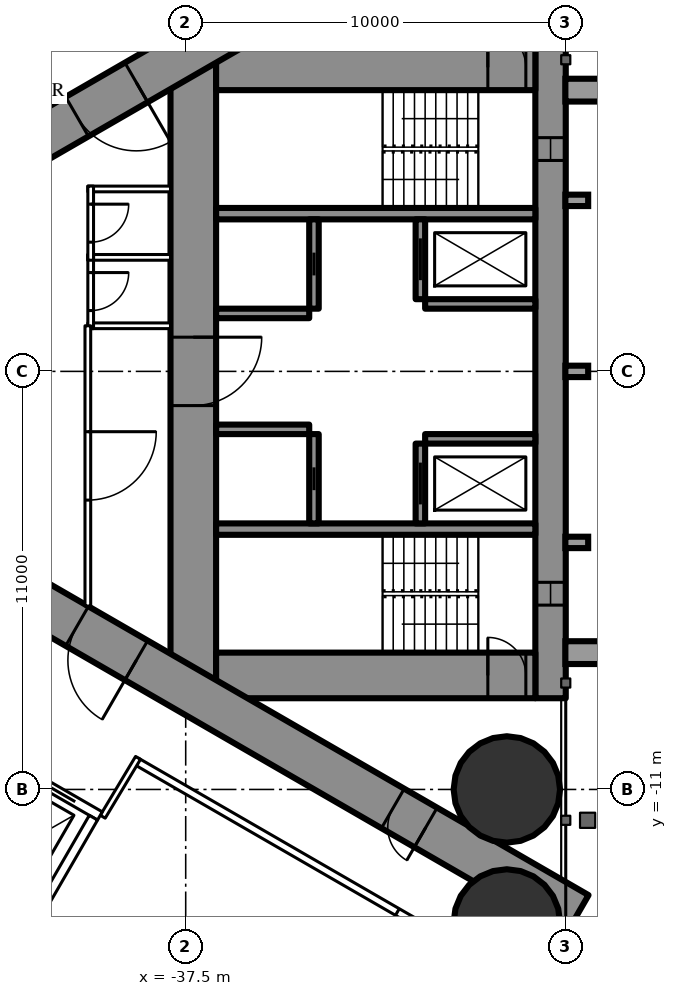
"""IFC4 building model, lengths in metres.
Left out: names, types, materials, properties, quantities, classifications, styles, units other than length and angle.
Written with IfcOpenShell. Run it as: python <this file> out.ifc"""

import sys

from ifc_helpers import new_model, si_unit, direction, frame, frame_2d, origin, origin_2d, place, context, subcontext, project, spatial, rectangle, circle, extrude, element, fill, save


model = new_model("IFC4")
c1 = context("Model", 3, precision=1e-05, world=origin(), true_north=direction((0.0, 1.0)))
c2 = subcontext(c1, "Body", "Model", "MODEL_VIEW")
j1 = project(units=[si_unit("LENGTHUNIT", "METRE"), si_unit("PLANEANGLEUNIT", "RADIAN")], contexts=[c1])
p1 = place(None, origin())
s1 = spatial("IfcSite", under=j1, at=p1, CompositionType="ELEMENT")
p2 = place(p1, origin())
s2 = spatial("IfcBuilding", under=s1, at=p2, CompositionType="ELEMENT")
p3 = place(p2, frame((0.0, 0.0, 163.3)))
s3 = spatial("IfcBuildingStorey", under=s2, at=p3, CompositionType="ELEMENT", Elevation=163.3)
for number, where, z_axis, x_axis in (
    (1, (-29.05, -11.0, 0.0), (0.0, 0.0, 1.0), (1.0, 0.0, 0.0)),
    (2, (-29.05, -14.5, 0.0), (0.0, 0.0, 1.0), (1.0, 0.0, 0.0)),
):
    element("IfcColumn", number, at=place(p3, frame(where, z_axis=z_axis, x_axis=x_axis)), inside=s3, PredefinedType="COLUMN", context=c2, shape_type="SweptSolid", body=[
        extrude(circle(Radius=1.4, at=origin_2d()), origin(), (0.0, 0.0, 1.0), 3.5),
    ])
p4 = place(p3, frame((-27.9, 8.6, 0.0), z_axis=(0.0, 0.0, 1.0), x_axis=(0.0, -1.0, 0.0)))
e3 = element("IfcWall", 3, at=p4, inside=s3, PredefinedType="SHEAR", context=c2, shape_type="SweptSolid", body=[
    extrude(rectangle(XDim=17.2, YDim=0.8, at=frame_2d((8.6, 0.0))), origin(), (0.0, 0.0, 1.0), 3.5),
])
p5 = place(p4, frame((2.45, 0.0, 0.6)))
e4 = element("IfcOpeningElement", 4, at=p5, cuts=e3, PredefinedType="OPENING", context=c2, shape_type="SweptSolid", body=[
    extrude(rectangle(XDim=0.6, YDim=2.1, at=frame_2d((0.3, 1.05))), frame((0.0, 0.41, 0.0), z_axis=(0.0, -1.0, 0.0), x_axis=(1.0, 0.0, 0.0)), (0.0, 0.0, 1.0), 0.82),
])
p6 = place(p4, frame((14.15, 0.0, 0.6)))
e5 = element("IfcOpeningElement", 5, at=p6, cuts=e3, PredefinedType="OPENING", context=c2, shape_type="SweptSolid", body=[
    extrude(rectangle(XDim=0.6, YDim=2.1, at=frame_2d((0.3, 1.05))), frame((0.0, 0.41, 0.0), z_axis=(0.0, -1.0, 0.0), x_axis=(1.0, 0.0, 0.0)), (0.0, 0.0, 1.0), 0.82),
])
p7 = place(p3, frame((-37.3, 8.6, 0.0), z_axis=(0.0, 0.0, 1.0), x_axis=(0.0, -1.0, 0.0)))
e6 = element("IfcWall", 6, at=p7, inside=s3, PredefinedType="SHEAR", context=c2, shape_type="SweptSolid", body=[
    extrude(rectangle(XDim=17.2, YDim=1.2, at=frame_2d((8.6, 0.0))), origin(), (0.0, 0.0, 1.0), 3.5),
])
p8 = place(p7, frame((7.7, 0.0, 0.0)))
e7 = element("IfcOpeningElement", 7, at=p8, cuts=e6, PredefinedType="OPENING", context=c2, shape_type="SweptSolid", body=[
    extrude(rectangle(XDim=1.8, YDim=2.2, at=frame_2d((0.9, 1.1))), frame((0.0, 0.61, 0.0), z_axis=(0.0, -1.0, 0.0), x_axis=(1.0, 0.0, 0.0)), (0.0, 0.0, 1.0), 1.22),
])
p9 = place(p3, frame((-28.3, 8.0, 0.0), z_axis=(0.0, 0.0, 1.0), x_axis=(-1.0, 0.0, 0.0)))
e8 = element("IfcWall", 8, at=p9, inside=s3, PredefinedType="SHEAR", context=c2, shape_type="SweptSolid", body=[
    extrude(rectangle(XDim=8.4, YDim=1.2, at=frame_2d((4.2, 0.0))), origin(), (0.0, 0.0, 1.0), 3.5),
])
p10 = place(p9, frame((0.25, 0.0, 0.0)))
e9 = element("IfcOpeningElement", 9, at=p10, cuts=e8, PredefinedType="OPENING", context=c2, shape_type="SweptSolid", body=[
    extrude(rectangle(XDim=1.0, YDim=2.2, at=frame_2d((0.5, 1.1))), frame((0.0, 0.61, 0.0), z_axis=(0.0, -1.0, 0.0), x_axis=(1.0, 0.0, 0.0)), (0.0, 0.0, 1.0), 1.22),
])
p11 = place(p3, frame((-28.3, -8.0, 0.0), z_axis=(0.0, 0.0, 1.0), x_axis=(-1.0, 0.0, 0.0)))
e10 = element("IfcWall", 10, at=p11, inside=s3, PredefinedType="SHEAR", context=c2, shape_type="SweptSolid", body=[
    extrude(rectangle(XDim=8.4, YDim=1.2, at=frame_2d((4.2, 0.0))), origin(), (0.0, 0.0, 1.0), 3.5),
])
p12 = place(p11, frame((0.25, 0.0, 0.0)))
e11 = element("IfcOpeningElement", 11, at=p12, cuts=e10, PredefinedType="OPENING", context=c2, shape_type="SweptSolid", body=[
    extrude(rectangle(XDim=1.0, YDim=2.2, at=frame_2d((0.5, 1.1))), frame((0.0, 0.61, 0.0), z_axis=(0.0, -1.0, 0.0), x_axis=(1.0, 0.0, 0.0)), (0.0, 0.0, 1.0), 1.22),
])
for number, where, z_axis, x_axis in (
    (12, (-28.3, 4.15, 0.0), (0.0, 0.0, 1.0), (-1.0, 0.0, 0.0)),
    (13, (-28.3, -4.15, 0.0), (0.0, 0.0, 1.0), (-1.0, 0.0, 0.0)),
):
    element("IfcWall", number, at=place(p3, frame(where, z_axis=z_axis, x_axis=x_axis)), inside=s3, PredefinedType="SHEAR", context=c2, shape_type="SweptSolid", body=[
        extrude(rectangle(XDim=8.4, YDim=0.3, at=frame_2d((4.2, 0.0))), origin(), (0.0, 0.0, 1.0), 3.5),
    ])
p13 = place(p3, frame((-31.325, 4.0, 0.0), z_axis=(0.0, 0.0, 1.0), x_axis=(0.0, -1.0, 0.0)))
e14 = element("IfcWall", 14, at=p13, inside=s3, PredefinedType="SHEAR", context=c2, shape_type="SweptSolid", body=[
    extrude(rectangle(XDim=2.1, YDim=0.25, at=frame_2d((1.05, 0.0))), origin(), (0.0, 0.0, 1.0), 3.5),
])
p14 = place(p13, frame((0.5, 0.0, 0.0)))
e15 = element("IfcOpeningElement", 15, at=p14, cuts=e14, PredefinedType="OPENING", context=c2, shape_type="SweptSolid", body=[
    extrude(rectangle(XDim=1.1, YDim=2.2, at=frame_2d((0.55, 1.1))), frame((0.0, 0.135, 0.0), z_axis=(0.0, -1.0, 0.0), x_axis=(1.0, 0.0, 0.0)), (0.0, 0.0, 1.0), 0.27),
])
p15 = place(p3, frame((-34.125, 4.0, 0.0), z_axis=(0.0, 0.0, 1.0), x_axis=(0.0, -1.0, 0.0)))
e16 = element("IfcWall", 16, at=p15, inside=s3, PredefinedType="SHEAR", context=c2, shape_type="SweptSolid", body=[
    extrude(rectangle(XDim=2.35, YDim=0.25, at=frame_2d((1.175, 0.0))), origin(), (0.0, 0.0, 1.0), 3.5),
])
p16 = place(p15, frame((0.875, 0.0, 0.0)))
e17 = element("IfcOpeningElement", 17, at=p16, cuts=e16, PredefinedType="OPENING", context=c2, shape_type="SweptSolid", body=[
    extrude(rectangle(XDim=0.6, YDim=2.0, at=frame_2d((0.3, 1.0))), frame((0.0, 0.135, 0.0), z_axis=(0.0, -1.0, 0.0), x_axis=(1.0, 0.0, 0.0)), (0.0, 0.0, 1.0), 0.27),
])
p17 = place(p3, frame((-28.3, 1.775, 0.0), z_axis=(0.0, 0.0, 1.0), x_axis=(-1.0, 0.0, 0.0)))
e18 = element("IfcWall", 18, at=p17, inside=s3, PredefinedType="SHEAR", context=c2, shape_type="SweptSolid", body=[
    extrude(rectangle(XDim=2.9, YDim=0.25, at=frame_2d((1.45, 0.0))), origin(), (0.0, 0.0, 1.0), 3.5),
])
p18 = place(p3, frame((-34.25, 1.525, 0.0), z_axis=(0.0, 0.0, 1.0), x_axis=(-1.0, 0.0, 0.0)))
e19 = element("IfcWall", 19, at=p18, inside=s3, PredefinedType="SHEAR", context=c2, shape_type="SweptSolid", body=[
    extrude(rectangle(XDim=2.45, YDim=0.25, at=frame_2d((1.225, 0.0))), origin(), (0.0, 0.0, 1.0), 3.5),
])
p19 = place(p3, frame((-31.325, -1.9, 0.0), z_axis=(0.0, 0.0, 1.0), x_axis=(0.0, -1.0, 0.0)))
e20 = element("IfcWall", 20, at=p19, inside=s3, PredefinedType="SHEAR", context=c2, shape_type="SweptSolid", body=[
    extrude(rectangle(XDim=2.1, YDim=0.25, at=frame_2d((1.05, 0.0))), origin(), (0.0, 0.0, 1.0), 3.5),
])
p20 = place(p19, frame((0.5, 0.0, 0.0)))
e21 = element("IfcOpeningElement", 21, at=p20, cuts=e20, PredefinedType="OPENING", context=c2, shape_type="SweptSolid", body=[
    extrude(rectangle(XDim=1.1, YDim=2.2, at=frame_2d((0.55, 1.1))), frame((0.0, 0.135, 0.0), z_axis=(0.0, -1.0, 0.0), x_axis=(1.0, 0.0, 0.0)), (0.0, 0.0, 1.0), 0.27),
])
p21 = place(p3, frame((-34.125, -1.65, 0.0), z_axis=(0.0, 0.0, 1.0), x_axis=(0.0, -1.0, 0.0)))
e22 = element("IfcWall", 22, at=p21, inside=s3, PredefinedType="SHEAR", context=c2, shape_type="SweptSolid", body=[
    extrude(rectangle(XDim=2.35, YDim=0.25, at=frame_2d((1.175, 0.0))), origin(), (0.0, 0.0, 1.0), 3.5),
])
p22 = place(p21, frame((0.875, 0.0, 0.0)))
e23 = element("IfcOpeningElement", 23, at=p22, cuts=e22, PredefinedType="OPENING", context=c2, shape_type="SweptSolid", body=[
    extrude(rectangle(XDim=0.6, YDim=2.0, at=frame_2d((0.3, 1.0))), frame((0.0, 0.135, 0.0), z_axis=(0.0, -1.0, 0.0), x_axis=(1.0, 0.0, 0.0)), (0.0, 0.0, 1.0), 0.27),
])
p23 = place(p3, frame((-28.3, -1.775, 0.0), z_axis=(0.0, 0.0, 1.0), x_axis=(-1.0, 0.0, 0.0)))
e24 = element("IfcWall", 24, at=p23, inside=s3, PredefinedType="SHEAR", context=c2, shape_type="SweptSolid", body=[
    extrude(rectangle(XDim=2.9, YDim=0.25, at=frame_2d((1.45, 0.0))), origin(), (0.0, 0.0, 1.0), 3.5),
])
p24 = place(p3, frame((-34.25, -1.525, 0.0), z_axis=(0.0, 0.0, 1.0), x_axis=(-1.0, 0.0, 0.0)))
e25 = element("IfcWall", 25, at=p24, inside=s3, PredefinedType="SHEAR", context=c2, shape_type="SweptSolid", body=[
    extrude(rectangle(XDim=2.45, YDim=0.25, at=frame_2d((1.225, 0.0))), origin(), (0.0, 0.0, 1.0), 3.5),
])
p25 = place(p3, frame((-27.2, 14.3, 0.0), z_axis=(0.0, 0.0, 1.0), x_axis=(-0.866026593062, -0.499997940104, 0.0)))
e26 = element("IfcWall", 26, at=p25, inside=s3, PredefinedType="SHEAR", context=c2, shape_type="SweptSolid", body=[
    extrude(rectangle(XDim=28.946, YDim=1.2, at=frame_2d((14.473, 0.0))), origin(), (0.0, 0.0, 1.0), 3.5),
])
p26 = place(p25, frame((4.6, 0.0, 0.0)))
e27 = element("IfcOpeningElement", 27, at=p26, cuts=e26, PredefinedType="OPENING", context=c2, shape_type="SweptSolid", body=[
    extrude(rectangle(XDim=1.0, YDim=2.2, at=frame_2d((0.5, 1.1))), frame((0.0, 0.61, 0.0), z_axis=(0.0, -1.0, 0.0), x_axis=(1.0, 0.0, 0.0)), (0.0, 0.0, 1.0), 1.22),
])
p27 = place(p25, frame((13.395, 0.0, 0.0)))
e28 = element("IfcOpeningElement", 28, at=p27, cuts=e26, PredefinedType="OPENING", context=c2, shape_type="SweptSolid", body=[
    extrude(rectangle(XDim=1.8, YDim=2.2, at=frame_2d((0.9, 1.1))), frame((0.0, 0.61, 0.0), z_axis=(0.0, -1.0, 0.0), x_axis=(1.0, 0.0, 0.0)), (0.0, 0.0, 1.0), 1.22),
])
p28 = place(p3, frame((-27.2, -14.3, 0.0), z_axis=(0.0, 0.0, 1.0), x_axis=(-0.866024021859, 0.500002393557, 0.0)))
e29 = element("IfcWall", 29, at=p28, inside=s3, PredefinedType="SHEAR", context=c2, shape_type="SweptSolid", body=[
    extrude(rectangle(XDim=27.907, YDim=1.2, at=frame_2d((13.954, 0.0))), origin(), (0.0, 0.0, 1.0), 3.5),
])
p29 = place(p28, frame((4.6, 0.0, 0.0)))
e30 = element("IfcOpeningElement", 30, at=p29, cuts=e29, PredefinedType="OPENING", context=c2, shape_type="SweptSolid", body=[
    extrude(rectangle(XDim=1.0, YDim=2.2, at=frame_2d((0.5, 1.1))), frame((0.0, 0.61, 0.0), z_axis=(0.0, -1.0, 0.0), x_axis=(1.0, 0.0, 0.0)), (0.0, 0.0, 1.0), 1.22),
])
p30 = place(p28, frame((13.395, 0.0, 0.0)))
e31 = element("IfcOpeningElement", 31, at=p30, cuts=e29, PredefinedType="OPENING", context=c2, shape_type="SweptSolid", body=[
    extrude(rectangle(XDim=1.8, YDim=2.2, at=frame_2d((0.9, 1.1))), frame((0.0, 0.61, 0.0), z_axis=(0.0, -1.0, 0.0), x_axis=(1.0, 0.0, 0.0)), (0.0, 0.0, 1.0), 1.22),
])
p31 = place(p3, frame((-27.86, -16.575, 0.0), z_axis=(0.0, 0.0, 1.0), x_axis=(-0.866027756871, 0.499995924312, 0.0)))
e32 = element("IfcWall", 32, at=p31, inside=s3, PredefinedType="PARTITIONING", context=c2, shape_type="SweptSolid", body=[
    extrude(rectangle(XDim=12.622, YDim=0.2, at=frame_2d((6.311, 0.0))), origin(), (0.0, 0.0, 1.0), 3.25),
])
p32 = place(p31, frame((3.75, 0.0, 0.0)))
e33 = element("IfcOpeningElement", 33, at=p32, cuts=e32, PredefinedType="OPENING", context=c2, shape_type="SweptSolid", body=[
    extrude(rectangle(XDim=0.95, YDim=2.2, at=frame_2d((0.475, 1.1))), frame((0.0, 0.11, 0.0), z_axis=(0.0, -1.0, 0.0), x_axis=(1.0, 0.0, 0.0)), (0.0, 0.0, 1.0), 0.22),
])
p33 = place(p3, frame((-39.683, -11.718, 0.0), z_axis=(0.0, 0.0, 1.0), x_axis=(0.514336634837, 0.857588377991, 0.0)))
e34 = element("IfcWall", 34, at=p33, inside=s3, PredefinedType="PARTITIONING", context=c2, shape_type="SweptSolid", body=[
    extrude(rectangle(XDim=1.805, YDim=0.15, at=frame_2d((0.903, 0.0))), origin(), (0.0, 0.0, 1.0), 3.25),
])
for number, where, z_axis, x_axis in (
    (35, (-37.9, 1.2, 0.0), (0.0, 0.0, 1.0), (-1.0, 0.0, 0.0)),
    (36, (-37.9, 3.0, 0.0), (0.0, 0.0, 1.0), (-1.0, 0.0, 0.0)),
    (37, (-37.9, 4.8, 0.0), (0.0, 0.0, 1.0), (-1.0, 0.0, 0.0)),
):
    element("IfcWall", number, at=place(p3, frame(where, z_axis=z_axis, x_axis=x_axis)), inside=s3, PredefinedType="PARTITIONING", context=c2, shape_type="SweptSolid", body=[
        extrude(rectangle(XDim=2.175, YDim=0.15, at=frame_2d((1.087, 0.0))), origin(), (0.0, 0.0, 1.0), 3.25),
    ])
p34 = place(p3, frame((-40.0, 3.075, 0.0), z_axis=(0.0, 0.0, 1.0), x_axis=(0.0, -1.0, 0.0)))
e38 = element("IfcWall", 38, at=p34, inside=s3, PredefinedType="PARTITIONING", context=c2, shape_type="SweptSolid", body=[
    extrude(rectangle(XDim=1.95, YDim=0.15, at=frame_2d((0.975, 0.0))), origin(), (0.0, 0.0, 1.0), 3.25),
])
p35 = place(p34, frame((0.475, 0.0, 0.0)))
e39 = element("IfcOpeningElement", 39, at=p35, cuts=e38, PredefinedType="OPENING", context=c2, shape_type="SweptSolid", body=[
    extrude(rectangle(XDim=1.0, YDim=2.2, at=frame_2d((0.5, 1.1))), frame((0.0, 0.085, 0.0), z_axis=(0.0, -1.0, 0.0), x_axis=(1.0, 0.0, 0.0)), (0.0, 0.0, 1.0), 0.17),
])
p36 = place(p3, frame((-40.0, 4.875, 0.0), z_axis=(0.0, 0.0, 1.0), x_axis=(0.0, -1.0, 0.0)))
e40 = element("IfcWall", 40, at=p36, inside=s3, PredefinedType="PARTITIONING", context=c2, shape_type="SweptSolid", body=[
    extrude(rectangle(XDim=1.95, YDim=0.15, at=frame_2d((0.975, 0.0))), origin(), (0.0, 0.0, 1.0), 3.25),
])
p37 = place(p36, frame((0.475, 0.0, 0.0)))
e41 = element("IfcOpeningElement", 41, at=p37, cuts=e40, PredefinedType="OPENING", context=c2, shape_type="SweptSolid", body=[
    extrude(rectangle(XDim=1.0, YDim=2.2, at=frame_2d((0.5, 1.1))), frame((0.0, 0.085, 0.0), z_axis=(0.0, -1.0, 0.0), x_axis=(1.0, 0.0, 0.0)), (0.0, 0.0, 1.0), 0.17),
])
p38 = place(p3, frame((-40.075, 1.2, 0.0), z_axis=(0.0, 0.0, 1.0), x_axis=(0.0, -1.0, 0.0)))
e42 = element("IfcWall", 42, at=p38, inside=s3, PredefinedType="PARTITIONING", context=c2, shape_type="SweptSolid", body=[
    extrude(rectangle(XDim=7.374, YDim=0.15, at=frame_2d((3.687, 0.0))), origin(), (0.0, 0.0, 1.0), 3.25),
])
p39 = place(p38, frame((2.787, 0.0, 0.0)))
e43 = element("IfcOpeningElement", 43, at=p39, cuts=e42, PredefinedType="OPENING", context=c2, shape_type="SweptSolid", body=[
    extrude(rectangle(XDim=1.8, YDim=2.2, at=frame_2d((0.9, 1.1))), frame((0.0, 0.085, 0.0), z_axis=(0.0, -1.0, 0.0), x_axis=(1.0, 0.0, 0.0)), (0.0, 0.0, 1.0), 0.17),
])
p40 = place(p3, frame((-39.758, -11.697, 0.0), z_axis=(0.0, 0.0, 1.0), x_axis=(-0.866024194504, 0.500002094529, 0.0)))
e44 = element("IfcWall", 44, at=p40, inside=s3, PredefinedType="PARTITIONING", context=c2, shape_type="SweptSolid", body=[
    extrude(rectangle(XDim=6.6, YDim=0.25, at=frame_2d((3.3, 0.0))), origin(), (0.0, 0.0, 1.0), 3.25),
])
p41 = place(p40, frame((0.75, 0.0, 0.0)))
e45 = element("IfcOpeningElement", 45, at=p41, cuts=e44, PredefinedType="OPENING", context=c2, shape_type="SweptSolid", body=[
    extrude(rectangle(XDim=1.1, YDim=2.2, at=frame_2d((0.55, 1.1))), frame((0.0, 0.135, 0.0), z_axis=(0.0, -1.0, 0.0), x_axis=(1.0, 0.0, 0.0)), (0.0, 0.0, 1.0), 0.27),
])
p42 = place(p40, frame((2.75, 0.0, 0.0)))
e46 = element("IfcOpeningElement", 46, at=p42, cuts=e44, PredefinedType="OPENING", context=c2, shape_type="SweptSolid", body=[
    extrude(rectangle(XDim=1.1, YDim=2.2, at=frame_2d((0.55, 1.1))), frame((0.0, 0.135, 0.0), z_axis=(0.0, -1.0, 0.0), x_axis=(1.0, 0.0, 0.0)), (0.0, 0.0, 1.0), 0.27),
])
p43 = place(p40, frame((4.75, 0.0, 0.0)))
e47 = element("IfcOpeningElement", 47, at=p43, cuts=e44, PredefinedType="OPENING", context=c2, shape_type="SweptSolid", body=[
    extrude(rectangle(XDim=1.1, YDim=2.2, at=frame_2d((0.55, 1.1))), frame((0.0, 0.135, 0.0), z_axis=(0.0, -1.0, 0.0), x_axis=(1.0, 0.0, 0.0)), (0.0, 0.0, 1.0), 0.27),
])
p44 = place(p3, frame((-39.928, -11.743, 0.0), z_axis=(0.0, 0.0, 1.0), x_axis=(-0.499929347863, -0.866066190972, 0.0)))
e48 = element("IfcWall", 48, at=p44, inside=s3, PredefinedType="PARTITIONING", context=c2, shape_type="SweptSolid", body=[
    extrude(rectangle(XDim=3.201, YDim=0.25, at=frame_2d((1.6, 0.0))), origin(), (0.0, 0.0, 1.0), 3.25),
])
p45 = place(p32, origin())
e49 = element("IfcDoor", 49, at=p45, inside=s3, OperationType="SINGLE_SWING_LEFT", PredefinedType="DOOR", context=c2, shape_type="SweptSolid", body=[
    extrude(rectangle(XDim=0.95, YDim=2.2, at=frame_2d((0.475, 1.1))), frame((0.0, 0.025, 0.0), z_axis=(0.0, -1.0, 0.0), x_axis=(1.0, 0.0, 0.0)), (0.0, 0.0, 1.0), 0.05),
])
fill(e33, e49)
p46 = place(p35, origin())
e50 = element("IfcDoor", 50, at=p46, inside=s3, OperationType="SINGLE_SWING_LEFT", PredefinedType="DOOR", context=c2, shape_type="SweptSolid", body=[
    extrude(rectangle(XDim=1.0, YDim=2.2, at=frame_2d((0.5, 1.1))), frame((0.0, 0.025, 0.0), z_axis=(0.0, -1.0, 0.0), x_axis=(1.0, 0.0, 0.0)), (0.0, 0.0, 1.0), 0.05),
])
fill(e39, e50)
p47 = place(p37, origin())
e51 = element("IfcDoor", 51, at=p47, inside=s3, OperationType="SINGLE_SWING_LEFT", PredefinedType="DOOR", context=c2, shape_type="SweptSolid", body=[
    extrude(rectangle(XDim=1.0, YDim=2.2, at=frame_2d((0.5, 1.1))), frame((0.0, 0.025, 0.0), z_axis=(0.0, -1.0, 0.0), x_axis=(1.0, 0.0, 0.0)), (0.0, 0.0, 1.0), 0.05),
])
fill(e41, e51)
p48 = place(p39, origin())
e52 = element("IfcDoor", 52, at=p48, inside=s3, OperationType="DOUBLE_DOOR_SINGLE_SWING", PredefinedType="DOOR", context=c2, shape_type="SweptSolid", body=[
    extrude(rectangle(XDim=1.8, YDim=2.2, at=frame_2d((0.9, 1.1))), frame((0.0, 0.025, 0.0), z_axis=(0.0, -1.0, 0.0), x_axis=(1.0, 0.0, 0.0)), (0.0, 0.0, 1.0), 0.05),
])
fill(e43, e52)
p49 = place(p27, origin())
e53 = element("IfcDoor", 53, at=p49, inside=s3, OperationType="DOUBLE_DOOR_SINGLE_SWING", PredefinedType="DOOR", context=c2, shape_type="SweptSolid", body=[
    extrude(rectangle(XDim=1.8, YDim=2.2, at=frame_2d((0.9, 1.1))), frame((0.0, 0.025, 0.0), z_axis=(0.0, -1.0, 0.0), x_axis=(1.0, 0.0, 0.0)), (0.0, 0.0, 1.0), 0.05),
])
fill(e28, e53)
p50 = place(p29, origin())
e54 = element("IfcDoor", 54, at=p50, inside=s3, OperationType="SINGLE_SWING_LEFT", PredefinedType="DOOR", context=c2, shape_type="SweptSolid", body=[
    extrude(rectangle(XDim=1.0, YDim=2.2, at=frame_2d((0.5, 1.1))), frame((0.0, 0.025, 0.0), z_axis=(0.0, -1.0, 0.0), x_axis=(1.0, 0.0, 0.0)), (0.0, 0.0, 1.0), 0.05),
])
fill(e30, e54)
p51 = place(p30, origin())
e55 = element("IfcDoor", 55, at=p51, inside=s3, OperationType="DOUBLE_DOOR_SINGLE_SWING", PredefinedType="DOOR", context=c2, shape_type="SweptSolid", body=[
    extrude(rectangle(XDim=1.8, YDim=2.2, at=frame_2d((0.9, 1.1))), frame((0.0, 0.025, 0.0), z_axis=(0.0, -1.0, 0.0), x_axis=(1.0, 0.0, 0.0)), (0.0, 0.0, 1.0), 0.05),
])
fill(e31, e55)
p52 = place(p8, origin())
e56 = element("IfcDoor", 56, at=p52, inside=s3, OperationType="DOUBLE_DOOR_SINGLE_SWING", PredefinedType="DOOR", context=c2, shape_type="SweptSolid", body=[
    extrude(rectangle(XDim=1.8, YDim=2.2, at=frame_2d((0.9, 1.1))), frame((0.0, 0.025, 0.0), z_axis=(0.0, -1.0, 0.0), x_axis=(1.0, 0.0, 0.0)), (0.0, 0.0, 1.0), 0.05),
])
fill(e7, e56)
p53 = place(p10, origin())
e57 = element("IfcDoor", 57, at=p53, inside=s3, OperationType="SINGLE_SWING_RIGHT", PredefinedType="DOOR", context=c2, shape_type="SweptSolid", body=[
    extrude(rectangle(XDim=1.0, YDim=2.2, at=frame_2d((0.5, 1.1))), frame((0.0, 0.025, 0.0), z_axis=(0.0, -1.0, 0.0), x_axis=(1.0, 0.0, 0.0)), (0.0, 0.0, 1.0), 0.05),
])
fill(e9, e57)
p54 = place(p12, origin())
e58 = element("IfcDoor", 58, at=p54, inside=s3, OperationType="SINGLE_SWING_RIGHT", PredefinedType="DOOR", context=c2, shape_type="SweptSolid", body=[
    extrude(rectangle(XDim=1.0, YDim=2.2, at=frame_2d((0.5, 1.1))), frame((0.0, 0.025, 0.0), z_axis=(0.0, -1.0, 0.0), x_axis=(1.0, 0.0, 0.0)), (0.0, 0.0, 1.0), 0.05),
])
fill(e11, e58)
p55 = place(p14, origin())
e59 = element("IfcDoor", 59, at=p55, inside=s3, OperationType="SLIDING_TO_LEFT", PredefinedType="USERDEFINED", context=c2, shape_type="SweptSolid", body=[
    extrude(rectangle(XDim=1.1, YDim=2.2, at=frame_2d((0.55, 1.1))), frame((0.0, 0.025, 0.0), z_axis=(0.0, -1.0, 0.0), x_axis=(1.0, 0.0, 0.0)), (0.0, 0.0, 1.0), 0.05),
])
fill(e15, e59)
p56 = place(p20, origin())
e60 = element("IfcDoor", 60, at=p56, inside=s3, OperationType="SLIDING_TO_LEFT", PredefinedType="USERDEFINED", context=c2, shape_type="SweptSolid", body=[
    extrude(rectangle(XDim=1.1, YDim=2.2, at=frame_2d((0.55, 1.1))), frame((0.0, 0.025, 0.0), z_axis=(0.0, -1.0, 0.0), x_axis=(1.0, 0.0, 0.0)), (0.0, 0.0, 1.0), 0.05),
])
fill(e21, e60)
p57 = place(p16, origin())
e61 = element("IfcDoor", 61, at=p57, inside=s3, OperationType="SLIDING_TO_LEFT", PredefinedType="DOOR", context=c2, shape_type="SweptSolid", body=[
    extrude(rectangle(XDim=0.6, YDim=2.0, at=frame_2d((0.3, 1.0))), frame((0.0, 0.025, 0.0), z_axis=(0.0, -1.0, 0.0), x_axis=(1.0, 0.0, 0.0)), (0.0, 0.0, 1.0), 0.05),
])
fill(e17, e61)
p58 = place(p22, origin())
e62 = element("IfcDoor", 62, at=p58, inside=s3, OperationType="SLIDING_TO_LEFT", PredefinedType="DOOR", context=c2, shape_type="SweptSolid", body=[
    extrude(rectangle(XDim=0.6, YDim=2.0, at=frame_2d((0.3, 1.0))), frame((0.0, 0.025, 0.0), z_axis=(0.0, -1.0, 0.0), x_axis=(1.0, 0.0, 0.0)), (0.0, 0.0, 1.0), 0.05),
])
fill(e23, e62)
p59 = place(p41, origin())
e63 = element("IfcDoor", 63, at=p59, inside=s3, OperationType="DOUBLE_DOOR_SLIDING", PredefinedType="USERDEFINED", context=c2, shape_type="SweptSolid", body=[
    extrude(rectangle(XDim=1.1, YDim=2.2, at=frame_2d((0.55, 1.1))), frame((0.0, 0.025, 0.0), z_axis=(0.0, -1.0, 0.0), x_axis=(1.0, 0.0, 0.0)), (0.0, 0.0, 1.0), 0.05),
])
fill(e45, e63)
p60 = place(p5, origin())
e64 = element("IfcWindow", 64, at=p60, inside=s3, PartitioningType="SINGLE_PANEL", PredefinedType="WINDOW", context=c2, shape_type="SweptSolid", body=[
    extrude(rectangle(XDim=0.6, YDim=2.1, at=frame_2d((0.3, 1.05))), frame((0.0, 0.03, 0.0), z_axis=(0.0, -1.0, 0.0), x_axis=(1.0, 0.0, 0.0)), (0.0, 0.0, 1.0), 0.06),
])
fill(e4, e64)
p61 = place(p6, origin())
e65 = element("IfcWindow", 65, at=p61, inside=s3, PartitioningType="SINGLE_PANEL", PredefinedType="WINDOW", context=c2, shape_type="SweptSolid", body=[
    extrude(rectangle(XDim=0.6, YDim=2.1, at=frame_2d((0.3, 1.05))), frame((0.0, 0.03, 0.0), z_axis=(0.0, -1.0, 0.0), x_axis=(1.0, 0.0, 0.0)), (0.0, 0.0, 1.0), 0.06),
])
fill(e5, e65)
save(model, sys.argv[1])
